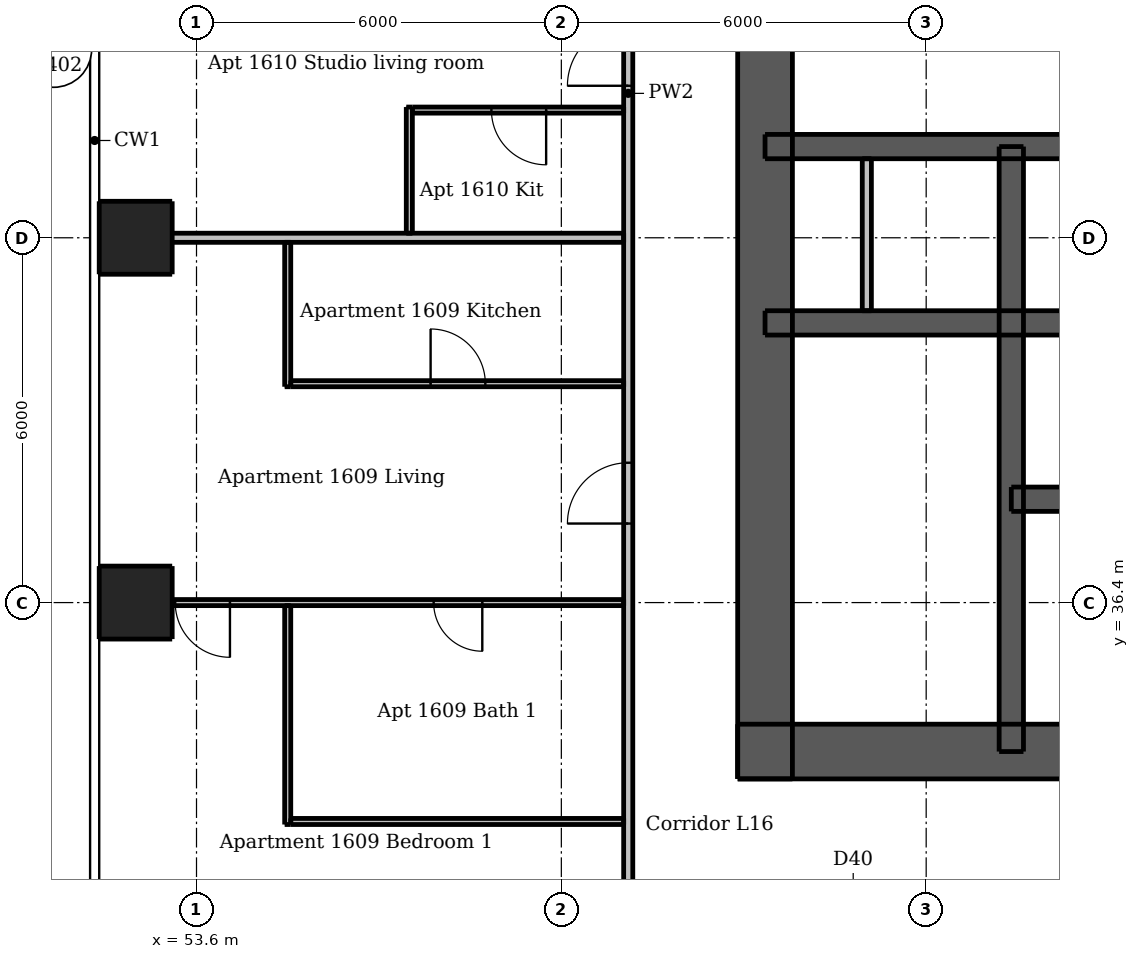
"""IFC4 building model, lengths in metres.
Left out: names, types, materials, properties, quantities, classifications, styles, units other than length and angle.
Written with IfcOpenShell. Run it as: python <this file> out.ifc"""

import sys

from ifc_helpers import new_model, si_unit, direction, frame, frame_2d, origin, origin_2d, place, context, subcontext, project, spatial, rectangle, extrude, element, fill, save


model = new_model("IFC4")
c1 = context("Model", 3, precision=1e-05, world=origin(), true_north=direction((0.0, 1.0)))
c2 = subcontext(c1, "Body", "Model", "MODEL_VIEW")
j1 = project(units=[si_unit("LENGTHUNIT", "METRE"), si_unit("PLANEANGLEUNIT", "RADIAN")], contexts=[c1])
p1 = place(None, origin())
s1 = spatial("IfcSite", under=j1, at=p1, CompositionType="ELEMENT")
p2 = place(p1, origin())
s2 = spatial("IfcBuilding", under=s1, at=p2, CompositionType="ELEMENT")
p3 = place(p2, frame((0.0, 0.0, 59.8)))
s3 = spatial("IfcBuildingStorey", under=s2, at=p3, CompositionType="ELEMENT", Elevation=59.8)
p4 = place(p3, frame((62.5, 33.95, 0.0), z_axis=(0.0, 0.0, 1.0), x_axis=(1.0, 0.0, 0.0)))
e1 = element("IfcWall", 1, at=p4, inside=s3, PredefinedType="SHEAR", context=c2, shape_type="SweptSolid", body=[
    extrude(rectangle(XDim=24.0, YDim=0.9, at=frame_2d((12.0, 0.0))), origin(), (0.0, 0.0, 1.0), 3.05),
])
p5 = place(p4, frame((2.05, 0.0, 0.0)))
e2 = element("IfcOpeningElement", 2, at=p5, cuts=e1, PredefinedType="OPENING", context=c2, shape_type="SweptSolid", body=[
    extrude(rectangle(XDim=1.1, YDim=2.1, at=frame_2d((0.55, 1.05))), frame((0.0, 0.46, 0.0), z_axis=(0.0, -1.0, 0.0), x_axis=(1.0, 0.0, 0.0)), (0.0, 0.0, 1.0), 0.92),
])
p6 = place(p4, frame((20.85, 0.0, 0.0)))
e3 = element("IfcOpeningElement", 3, at=p6, cuts=e1, PredefinedType="OPENING", context=c2, shape_type="SweptSolid", body=[
    extrude(rectangle(XDim=1.1, YDim=2.1, at=frame_2d((0.55, 1.05))), frame((0.0, 0.46, 0.0), z_axis=(0.0, -1.0, 0.0), x_axis=(1.0, 0.0, 0.0)), (0.0, 0.0, 1.0), 0.92),
])
p7 = place(p4, frame((8.0, 0.0, 0.0)))
e4 = element("IfcOpeningElement", 4, at=p7, cuts=e1, PredefinedType="OPENING", context=c2, shape_type="SweptSolid", body=[
    extrude(rectangle(XDim=1.1, YDim=2.1, at=frame_2d((0.55, 1.05))), frame((0.0, 0.46, 0.0), z_axis=(0.0, -1.0, 0.0), x_axis=(1.0, 0.0, 0.0)), (0.0, 0.0, 1.0), 0.92),
])
p8 = place(p4, frame((15.3, 0.0, 0.0)))
e5 = element("IfcOpeningElement", 5, at=p8, cuts=e1, PredefinedType="OPENING", context=c2, shape_type="SweptSolid", body=[
    extrude(rectangle(XDim=0.9, YDim=2.1, at=frame_2d((0.45, 1.05))), frame((0.0, 0.46, 0.0), z_axis=(0.0, -1.0, 0.0), x_axis=(1.0, 0.0, 0.0)), (0.0, 0.0, 1.0), 0.92),
])
p9 = place(p3, frame((62.95, 33.5, 0.0), z_axis=(0.0, 0.0, 1.0), x_axis=(0.0, 1.0, 0.0)))
e6 = element("IfcWall", 6, at=p9, inside=s3, PredefinedType="SHEAR", context=c2, shape_type="SweptSolid", body=[
    extrude(rectangle(XDim=24.0, YDim=0.9, at=frame_2d((12.0, 0.0))), origin(), (0.0, 0.0, 1.0), 3.05),
])
p10 = place(p9, frame((11.2, 0.0, 0.0)))
e7 = element("IfcOpeningElement", 7, at=p10, cuts=e6, PredefinedType="OPENING", context=c2, shape_type="SweptSolid", body=[
    extrude(rectangle(XDim=1.6, YDim=2.1, at=frame_2d((0.8, 1.05))), frame((0.0, 0.46, 0.0), z_axis=(0.0, -1.0, 0.0), x_axis=(1.0, 0.0, 0.0)), (0.0, 0.0, 1.0), 0.92),
])
p11 = place(p3, frame((62.95, 41.0, 0.0), z_axis=(0.0, 0.0, 1.0), x_axis=(1.0, 0.0, 0.0)))
e8 = element("IfcWall", 8, at=p11, inside=s3, PredefinedType="SHEAR", context=c2, shape_type="SweptSolid", body=[
    extrude(rectangle(XDim=23.1, YDim=0.4, at=frame_2d((11.55, 0.0))), origin(), (0.0, 0.0, 1.0), 3.05),
])
p12 = place(p3, frame((62.95, 43.9, 0.0), z_axis=(0.0, 0.0, 1.0), x_axis=(1.0, 0.0, 0.0)))
e9 = element("IfcWall", 9, at=p12, inside=s3, PredefinedType="SHEAR", context=c2, shape_type="SweptSolid", body=[
    extrude(rectangle(XDim=23.1, YDim=0.4, at=frame_2d((11.55, 0.0))), origin(), (0.0, 0.0, 1.0), 3.05),
])
p13 = place(p12, frame((0.662, 0.0, 0.0)))
e10 = element("IfcOpeningElement", 10, at=p13, cuts=e9, PredefinedType="OPENING", context=c2, shape_type="SweptSolid", body=[
    extrude(rectangle(XDim=0.8, YDim=2.1, at=frame_2d((0.4, 1.05))), frame((0.0, 0.21, 0.0), z_axis=(0.0, -1.0, 0.0), x_axis=(1.0, 0.0, 0.0)), (0.0, 0.0, 1.0), 0.42),
])
p14 = place(p12, frame((2.312, 0.0, 0.0)))
e11 = element("IfcOpeningElement", 11, at=p14, cuts=e9, PredefinedType="OPENING", context=c2, shape_type="SweptSolid", body=[
    extrude(rectangle(XDim=0.9, YDim=2.1, at=frame_2d((0.45, 1.05))), frame((0.0, 0.21, 0.0), z_axis=(0.0, -1.0, 0.0), x_axis=(1.0, 0.0, 0.0)), (0.0, 0.0, 1.0), 0.42),
])
p15 = place(p12, frame((20.5, 0.0, 0.0)))
e12 = element("IfcOpeningElement", 12, at=p15, cuts=e9, PredefinedType="OPENING", context=c2, shape_type="SweptSolid", body=[
    extrude(rectangle(XDim=0.9, YDim=2.1, at=frame_2d((0.45, 1.05))), frame((0.0, 0.21, 0.0), z_axis=(0.0, -1.0, 0.0), x_axis=(1.0, 0.0, 0.0)), (0.0, 0.0, 1.0), 0.42),
])
p16 = place(p12, frame((4.75, 0.0, 0.0)))
e13 = element("IfcOpeningElement", 13, at=p16, cuts=e9, PredefinedType="OPENING", context=c2, shape_type="SweptSolid", body=[
    extrude(rectangle(XDim=1.1, YDim=2.1, at=frame_2d((0.55, 1.05))), frame((0.0, 0.21, 0.0), z_axis=(0.0, -1.0, 0.0), x_axis=(1.0, 0.0, 0.0)), (0.0, 0.0, 1.0), 0.42),
])
p17 = place(p12, frame((7.25, 0.0, 0.0)))
e14 = element("IfcOpeningElement", 14, at=p17, cuts=e9, PredefinedType="OPENING", context=c2, shape_type="SweptSolid", body=[
    extrude(rectangle(XDim=1.1, YDim=2.1, at=frame_2d((0.55, 1.05))), frame((0.0, 0.21, 0.0), z_axis=(0.0, -1.0, 0.0), x_axis=(1.0, 0.0, 0.0)), (0.0, 0.0, 1.0), 0.42),
])
p18 = place(p12, frame((9.75, 0.0, 0.0)))
e15 = element("IfcOpeningElement", 15, at=p18, cuts=e9, PredefinedType="OPENING", context=c2, shape_type="SweptSolid", body=[
    extrude(rectangle(XDim=1.1, YDim=2.1, at=frame_2d((0.55, 1.05))), frame((0.0, 0.21, 0.0), z_axis=(0.0, -1.0, 0.0), x_axis=(1.0, 0.0, 0.0)), (0.0, 0.0, 1.0), 0.42),
])
p19 = place(p12, frame((12.25, 0.0, 0.0)))
e16 = element("IfcOpeningElement", 16, at=p19, cuts=e9, PredefinedType="OPENING", context=c2, shape_type="SweptSolid", body=[
    extrude(rectangle(XDim=1.1, YDim=2.1, at=frame_2d((0.55, 1.05))), frame((0.0, 0.21, 0.0), z_axis=(0.0, -1.0, 0.0), x_axis=(1.0, 0.0, 0.0)), (0.0, 0.0, 1.0), 0.42),
])
p20 = place(p12, frame((14.75, 0.0, 0.0)))
e17 = element("IfcOpeningElement", 17, at=p20, cuts=e9, PredefinedType="OPENING", context=c2, shape_type="SweptSolid", body=[
    extrude(rectangle(XDim=1.1, YDim=2.1, at=frame_2d((0.55, 1.05))), frame((0.0, 0.21, 0.0), z_axis=(0.0, -1.0, 0.0), x_axis=(1.0, 0.0, 0.0)), (0.0, 0.0, 1.0), 0.42),
])
p21 = place(p12, frame((17.25, 0.0, 0.0)))
e18 = element("IfcOpeningElement", 18, at=p21, cuts=e9, PredefinedType="OPENING", context=c2, shape_type="SweptSolid", body=[
    extrude(rectangle(XDim=1.1, YDim=2.1, at=frame_2d((0.55, 1.05))), frame((0.0, 0.21, 0.0), z_axis=(0.0, -1.0, 0.0), x_axis=(1.0, 0.0, 0.0)), (0.0, 0.0, 1.0), 0.42),
])
p22 = place(p3, frame((67.0, 33.95, 0.0), z_axis=(0.0, 0.0, 1.0), x_axis=(0.0, 1.0, 0.0)))
e19 = element("IfcWall", 19, at=p22, inside=s3, PredefinedType="SHEAR", context=c2, shape_type="SweptSolid", body=[
    extrude(rectangle(XDim=9.95, YDim=0.4, at=frame_2d((4.975, 0.0))), origin(), (0.0, 0.0, 1.0), 3.05),
])
p23 = place(p22, frame((0.65, 0.0, 0.0)))
e20 = element("IfcOpeningElement", 20, at=p23, cuts=e19, PredefinedType="OPENING", context=c2, shape_type="SweptSolid", body=[
    extrude(rectangle(XDim=1.1, YDim=2.1, at=frame_2d((0.55, 1.05))), frame((0.0, 0.21, 0.0), z_axis=(0.0, -1.0, 0.0), x_axis=(1.0, 0.0, 0.0)), (0.0, 0.0, 1.0), 0.42),
])
p24 = place(p3, frame((67.0, 38.1, 0.0), z_axis=(0.0, 0.0, 1.0), x_axis=(1.0, 0.0, 0.0)))
e21 = element("IfcWall", 21, at=p24, inside=s3, PredefinedType="SHEAR", context=c2, shape_type="SweptSolid", body=[
    extrude(rectangle(XDim=7.5, YDim=0.4, at=frame_2d((3.75, 0.0))), origin(), (0.0, 0.0, 1.0), 3.05),
])
p25 = place(p24, frame((0.7, 0.0, 0.0)))
e22 = element("IfcOpeningElement", 22, at=p25, cuts=e21, PredefinedType="OPENING", context=c2, shape_type="SweptSolid", body=[
    extrude(rectangle(XDim=1.1, YDim=2.1, at=frame_2d((0.55, 1.05))), frame((0.0, 0.21, 0.0), z_axis=(0.0, -1.0, 0.0), x_axis=(1.0, 0.0, 0.0)), (0.0, 0.0, 1.0), 0.42),
])
p26 = place(p24, frame((3.2, 0.0, 0.0)))
e23 = element("IfcOpeningElement", 23, at=p26, cuts=e21, PredefinedType="OPENING", context=c2, shape_type="SweptSolid", body=[
    extrude(rectangle(XDim=1.1, YDim=2.1, at=frame_2d((0.55, 1.05))), frame((0.0, 0.21, 0.0), z_axis=(0.0, -1.0, 0.0), x_axis=(1.0, 0.0, 0.0)), (0.0, 0.0, 1.0), 0.42),
])
p27 = place(p24, frame((5.65, 0.0, 0.0)))
e24 = element("IfcOpeningElement", 24, at=p27, cuts=e21, PredefinedType="OPENING", context=c2, shape_type="SweptSolid", body=[
    extrude(rectangle(XDim=1.2, YDim=2.1, at=frame_2d((0.6, 1.05))), frame((0.0, 0.21, 0.0), z_axis=(0.0, -1.0, 0.0), x_axis=(1.0, 0.0, 0.0)), (0.0, 0.0, 1.0), 0.42),
])
for number, where, z_axis, x_axis in (
    (25, (52.6, 36.4, 0.0), (0.0, 0.0, 1.0), (1.0, 0.0, 0.0)),
    (26, (52.6, 42.4, 0.0), (0.0, 0.0, 1.0), (1.0, 0.0, 0.0)),
):
    element("IfcColumn", number, at=place(p3, frame(where, z_axis=z_axis, x_axis=x_axis)), inside=s3, PredefinedType="COLUMN", context=c2, shape_type="SweptSolid", body=[
        extrude(rectangle(XDim=1.2, YDim=1.2, at=origin_2d()), origin(), (0.0, 0.0, 1.0), 3.05),
    ])
p28 = place(p3, frame((64.624, 41.2, 0.0), z_axis=(0.0, 0.0, 1.0), x_axis=(0.0, 1.0, 0.0)))
e27 = element("IfcWall", 27, at=p28, inside=s3, PredefinedType="PLUMBINGWALL", context=c2, shape_type="SweptSolid", body=[
    extrude(rectangle(XDim=2.5, YDim=0.15, at=frame_2d((1.25, 0.0))), origin(), (0.0, 0.0, 1.0), 3.05),
])
p29 = place(p3, frame((55.1, 32.75, 0.0), z_axis=(0.0, 0.0, 1.0), x_axis=(0.0, 1.0, 0.0)))
e28 = element("IfcWall", 28, at=p29, inside=s3, PredefinedType="PARTITIONING", context=c2, shape_type="SweptSolid", body=[
    extrude(rectangle(XDim=3.6, YDim=0.1, at=frame_2d((1.8, 0.0))), origin(), (0.0, 0.0, 1.0), 3.05),
])
p30 = place(p3, frame((55.1, 39.95, 0.0), z_axis=(0.0, 0.0, 1.0), x_axis=(0.0, 1.0, 0.0)))
e29 = element("IfcWall", 29, at=p30, inside=s3, PredefinedType="PARTITIONING", context=c2, shape_type="SweptSolid", body=[
    extrude(rectangle(XDim=2.375, YDim=0.1, at=frame_2d((1.188, 0.0))), origin(), (0.0, 0.0, 1.0), 3.05),
])
p31 = place(p3, frame((57.1, 42.475, 0.0), z_axis=(0.0, 0.0, 1.0), x_axis=(0.0, 1.0, 0.0)))
e30 = element("IfcWall", 30, at=p31, inside=s3, PredefinedType="PARTITIONING", context=c2, shape_type="SweptSolid", body=[
    extrude(rectangle(XDim=2.075, YDim=0.1, at=frame_2d((1.038, 0.0))), origin(), (0.0, 0.0, 1.0), 3.05),
])
p32 = place(p3, frame((60.625, 44.5, 0.0), z_axis=(0.0, 0.0, 1.0), x_axis=(-1.0, 0.0, 0.0)))
e31 = element("IfcWall", 31, at=p32, inside=s3, PredefinedType="PARTITIONING", context=c2, shape_type="SweptSolid", body=[
    extrude(rectangle(XDim=3.475, YDim=0.1, at=frame_2d((1.738, 0.0))), origin(), (0.0, 0.0, 1.0), 3.05),
])
p33 = place(p32, frame((1.275, 0.0, 0.0)))
e32 = element("IfcOpeningElement", 32, at=p33, cuts=e31, PredefinedType="OPENING", context=c2, shape_type="SweptSolid", body=[
    extrude(rectangle(XDim=0.9, YDim=2.1, at=frame_2d((0.45, 1.05))), frame((0.0, 0.06, 0.0), z_axis=(0.0, -1.0, 0.0), x_axis=(1.0, 0.0, 0.0)), (0.0, 0.0, 1.0), 0.12),
])
p34 = place(p3, frame((55.15, 40.0, 0.0), z_axis=(0.0, 0.0, 1.0), x_axis=(1.0, 0.0, 0.0)))
e33 = element("IfcWall", 33, at=p34, inside=s3, PredefinedType="PARTITIONING", context=c2, shape_type="SweptSolid", body=[
    extrude(rectangle(XDim=5.475, YDim=0.1, at=frame_2d((2.738, 0.0))), origin(), (0.0, 0.0, 1.0), 3.05),
])
p35 = place(p34, frame((2.3, 0.0, 0.0)))
e34 = element("IfcOpeningElement", 34, at=p35, cuts=e33, PredefinedType="OPENING", context=c2, shape_type="SweptSolid", body=[
    extrude(rectangle(XDim=0.9, YDim=2.1, at=frame_2d((0.45, 1.05))), frame((0.0, 0.06, 0.0), z_axis=(0.0, -1.0, 0.0), x_axis=(1.0, 0.0, 0.0)), (0.0, 0.0, 1.0), 0.12),
])
p36 = place(p3, frame((60.625, 36.4, 0.0), z_axis=(0.0, 0.0, 1.0), x_axis=(-1.0, 0.0, 0.0)))
e35 = element("IfcWall", 35, at=p36, inside=s3, PredefinedType="PARTITIONING", context=c2, shape_type="SweptSolid", body=[
    extrude(rectangle(XDim=8.625, YDim=0.1, at=frame_2d((4.312, 0.0))), origin(), (0.0, 0.0, 1.0), 2.516),
])
p37 = place(p36, frame((6.475, 0.0, 0.0)))
e36 = element("IfcOpeningElement", 36, at=p37, cuts=e35, PredefinedType="OPENING", context=c2, shape_type="SweptSolid", body=[
    extrude(rectangle(XDim=0.9, YDim=2.1, at=frame_2d((0.45, 1.05))), frame((0.0, 0.06, 0.0), z_axis=(0.0, -1.0, 0.0), x_axis=(1.0, 0.0, 0.0)), (0.0, 0.0, 1.0), 0.12),
])
p38 = place(p36, frame((2.325, 0.0, 0.0)))
e37 = element("IfcOpeningElement", 37, at=p38, cuts=e35, PredefinedType="OPENING", context=c2, shape_type="SweptSolid", body=[
    extrude(rectangle(XDim=0.8, YDim=2.1, at=frame_2d((0.4, 1.05))), frame((0.0, 0.06, 0.0), z_axis=(0.0, -1.0, 0.0), x_axis=(1.0, 0.0, 0.0)), (0.0, 0.0, 1.0), 0.12),
])
p39 = place(p3, frame((55.15, 32.8, 0.0), z_axis=(0.0, 0.0, 1.0), x_axis=(1.0, 0.0, 0.0)))
e38 = element("IfcWall", 38, at=p39, inside=s3, PredefinedType="PARTITIONING", context=c2, shape_type="SweptSolid", body=[
    extrude(rectangle(XDim=5.475, YDim=0.1, at=frame_2d((2.738, 0.0))), origin(), (0.0, 0.0, 1.0), 3.05),
])
p40 = place(p3, frame((60.7, 30.325, 0.0), z_axis=(0.0, 0.0, 1.0), x_axis=(0.0, 1.0, 0.0)))
e39 = element("IfcWall", 39, at=p40, inside=s3, PredefinedType="PARTITIONING", context=c2, shape_type="SweptSolid", body=[
    extrude(rectangle(XDim=28.9, YDim=0.15, at=frame_2d((14.45, 0.0))), origin(), (0.0, 0.0, 1.0), 3.05),
])
p41 = place(p40, frame((7.375, 0.0, 0.0)))
e40 = element("IfcOpeningElement", 40, at=p41, cuts=e39, PredefinedType="OPENING", context=c2, shape_type="SweptSolid", body=[
    extrude(rectangle(XDim=1.0, YDim=2.1, at=frame_2d((0.5, 1.05))), frame((0.0, 0.085, 0.0), z_axis=(0.0, -1.0, 0.0), x_axis=(1.0, 0.0, 0.0)), (0.0, 0.0, 1.0), 0.17),
])
p42 = place(p40, frame((14.575, 0.0, 0.0)))
e41 = element("IfcOpeningElement", 41, at=p42, cuts=e39, PredefinedType="OPENING", context=c2, shape_type="SweptSolid", body=[
    extrude(rectangle(XDim=1.0, YDim=2.1, at=frame_2d((0.5, 1.05))), frame((0.0, 0.085, 0.0), z_axis=(0.0, -1.0, 0.0), x_axis=(1.0, 0.0, 0.0)), (0.0, 0.0, 1.0), 0.17),
])
p43 = place(p40, frame((26.025, 0.0, 0.0)))
e42 = element("IfcOpeningElement", 42, at=p43, cuts=e39, PredefinedType="OPENING", context=c2, shape_type="SweptSolid", body=[
    extrude(rectangle(XDim=1.0, YDim=2.1, at=frame_2d((0.5, 1.05))), frame((0.0, 0.085, 0.0), z_axis=(0.0, -1.0, 0.0), x_axis=(1.0, 0.0, 0.0)), (0.0, 0.0, 1.0), 0.17),
])
p44 = place(p3, frame((52.0, 42.4, 0.0), z_axis=(0.0, 0.0, 1.0), x_axis=(1.0, 0.0, 0.0)))
e43 = element("IfcWall", 43, at=p44, inside=s3, PredefinedType="PARTITIONING", context=c2, shape_type="SweptSolid", body=[
    extrude(rectangle(XDim=8.625, YDim=0.15, at=frame_2d((4.312, 0.0))), origin(), (0.0, 0.0, 1.0), 2.516),
])
p45 = place(p5, origin())
e44 = element("IfcDoor", 44, at=p45, inside=s3, OperationType="SINGLE_SWING_LEFT", PredefinedType="DOOR", context=c2, shape_type="SweptSolid", body=[
    extrude(rectangle(XDim=1.1, YDim=2.1, at=frame_2d((0.55, 1.05))), frame((0.0, 0.438, 0.0), z_axis=(0.0, -1.0, 0.0), x_axis=(1.0, 0.0, 0.0)), (0.0, 0.0, 1.0), 0.05),
])
fill(e2, e44)
p46 = place(p10, origin())
e45 = element("IfcDoor", 45, at=p46, inside=s3, OperationType="DOUBLE_DOOR_SINGLE_SWING", PredefinedType="DOOR", context=c2, shape_type="SweptSolid", body=[
    extrude(rectangle(XDim=1.6, YDim=2.1, at=frame_2d((0.8, 1.05))), frame((0.0, -0.388, 0.0), z_axis=(0.0, -1.0, 0.0), x_axis=(1.0, 0.0, 0.0)), (0.0, 0.0, 1.0), 0.05),
])
fill(e7, e45)
p47 = place(p23, origin())
e46 = element("IfcDoor", 46, at=p47, inside=s3, OperationType="SINGLE_SWING_RIGHT", PredefinedType="DOOR", context=c2, shape_type="SweptSolid", body=[
    extrude(rectangle(XDim=1.1, YDim=2.1, at=frame_2d((0.55, 1.05))), frame((0.0, -0.138, 0.0), z_axis=(0.0, -1.0, 0.0), x_axis=(1.0, 0.0, 0.0)), (0.0, 0.0, 1.0), 0.05),
])
fill(e20, e46)
p48 = place(p13, origin())
e47 = element("IfcDoor", 47, at=p48, inside=s3, OperationType="SINGLE_SWING_LEFT", PredefinedType="DOOR", context=c2, shape_type="SweptSolid", body=[
    extrude(rectangle(XDim=0.8, YDim=2.1, at=frame_2d((0.4, 1.05))), frame((0.0, -0.138, 0.0), z_axis=(0.0, -1.0, 0.0), x_axis=(1.0, 0.0, 0.0)), (0.0, 0.0, 1.0), 0.05),
])
fill(e10, e47)
p49 = place(p14, origin())
e48 = element("IfcDoor", 48, at=p49, inside=s3, OperationType="SINGLE_SWING_RIGHT", PredefinedType="DOOR", context=c2, shape_type="SweptSolid", body=[
    extrude(rectangle(XDim=0.9, YDim=2.1, at=frame_2d((0.45, 1.05))), frame((0.0, -0.138, 0.0), z_axis=(0.0, -1.0, 0.0), x_axis=(1.0, 0.0, 0.0)), (0.0, 0.0, 1.0), 0.05),
])
fill(e11, e48)
p50 = place(p16, origin())
e49 = element("IfcDoor", 49, at=p50, inside=s3, OperationType="DOUBLE_DOOR_SLIDING", PredefinedType="DOOR", context=c2, shape_type="SweptSolid", body=[
    extrude(rectangle(XDim=1.1, YDim=2.1, at=frame_2d((0.55, 1.05))), frame((0.0, 0.025, 0.0), z_axis=(0.0, -1.0, 0.0), x_axis=(1.0, 0.0, 0.0)), (0.0, 0.0, 1.0), 0.05),
])
fill(e13, e49)
p51 = place(p25, origin())
e50 = element("IfcDoor", 50, at=p51, inside=s3, OperationType="DOUBLE_DOOR_SLIDING", PredefinedType="DOOR", context=c2, shape_type="SweptSolid", body=[
    extrude(rectangle(XDim=1.1, YDim=2.1, at=frame_2d((0.55, 1.05))), frame((0.0, 0.025, 0.0), z_axis=(0.0, -1.0, 0.0), x_axis=(1.0, 0.0, 0.0)), (0.0, 0.0, 1.0), 0.05),
])
fill(e22, e50)
p52 = place(p41, origin())
e51 = element("IfcDoor", 51, at=p52, inside=s3, OperationType="SINGLE_SWING_LEFT", PredefinedType="DOOR", context=c2, shape_type="SweptSolid", body=[
    extrude(rectangle(XDim=1.0, YDim=2.1, at=frame_2d((0.5, 1.05))), frame((0.0, 0.025, 0.0), z_axis=(0.0, -1.0, 0.0), x_axis=(1.0, 0.0, 0.0)), (0.0, 0.0, 1.0), 0.05),
])
fill(e40, e51)
p53 = place(p35, origin())
e52 = element("IfcDoor", 52, at=p53, inside=s3, OperationType="SINGLE_SWING_LEFT", PredefinedType="DOOR", context=c2, shape_type="SweptSolid", body=[
    extrude(rectangle(XDim=0.9, YDim=2.1, at=frame_2d((0.45, 1.05))), frame((0.0, 0.025, 0.0), z_axis=(0.0, -1.0, 0.0), x_axis=(1.0, 0.0, 0.0)), (0.0, 0.0, 1.0), 0.05),
])
fill(e34, e52)
p54 = place(p37, origin())
e53 = element("IfcDoor", 53, at=p54, inside=s3, OperationType="SINGLE_SWING_LEFT", PredefinedType="DOOR", context=c2, shape_type="SweptSolid", body=[
    extrude(rectangle(XDim=0.9, YDim=2.1, at=frame_2d((0.45, 1.05))), frame((0.0, 0.025, 0.0), z_axis=(0.0, -1.0, 0.0), x_axis=(1.0, 0.0, 0.0)), (0.0, 0.0, 1.0), 0.05),
])
fill(e36, e53)
p55 = place(p38, origin())
e54 = element("IfcDoor", 54, at=p55, inside=s3, OperationType="SINGLE_SWING_LEFT", PredefinedType="DOOR", context=c2, shape_type="SweptSolid", body=[
    extrude(rectangle(XDim=0.8, YDim=2.1, at=frame_2d((0.4, 1.05))), frame((0.0, 0.025, 0.0), z_axis=(0.0, -1.0, 0.0), x_axis=(1.0, 0.0, 0.0)), (0.0, 0.0, 1.0), 0.05),
])
fill(e37, e54)
p56 = place(p42, origin())
e55 = element("IfcDoor", 55, at=p56, inside=s3, OperationType="SINGLE_SWING_LEFT", PredefinedType="DOOR", context=c2, shape_type="SweptSolid", body=[
    extrude(rectangle(XDim=1.0, YDim=2.1, at=frame_2d((0.5, 1.05))), frame((0.0, 0.025, 0.0), z_axis=(0.0, -1.0, 0.0), x_axis=(1.0, 0.0, 0.0)), (0.0, 0.0, 1.0), 0.05),
])
fill(e41, e55)
p57 = place(p33, origin())
e56 = element("IfcDoor", 56, at=p57, inside=s3, OperationType="SINGLE_SWING_LEFT", PredefinedType="DOOR", context=c2, shape_type="SweptSolid", body=[
    extrude(rectangle(XDim=0.9, YDim=2.1, at=frame_2d((0.45, 1.05))), frame((0.0, 0.025, 0.0), z_axis=(0.0, -1.0, 0.0), x_axis=(1.0, 0.0, 0.0)), (0.0, 0.0, 1.0), 0.05),
])
fill(e32, e56)
save(model, sys.argv[1])
